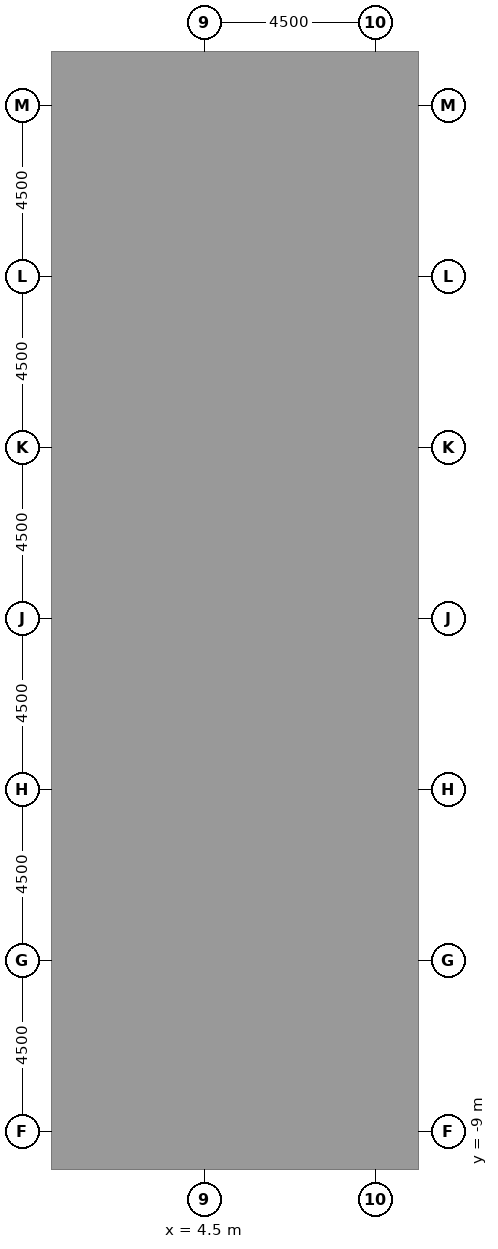
"""IFC4 building model, lengths in metres.
Left out: names, types, materials, properties, quantities, classifications, styles, units other than length and angle.
Written with IfcOpenShell. Run it as: python <this file> out.ifc"""

import sys

from ifc_helpers import new_model, si_unit, direction, frame, frame_2d, origin, place, context, subcontext, project, spatial, rectangle, extrude, element, fill, save


model = new_model("IFC4")
c1 = context("Model", 3, precision=1e-05, world=origin(), true_north=direction((0.0, 1.0)))
c2 = subcontext(c1, "Body", "Model", "MODEL_VIEW")
j1 = project(units=[si_unit("LENGTHUNIT", "METRE"), si_unit("PLANEANGLEUNIT", "RADIAN")], contexts=[c1])
p1 = place(None, origin())
s1 = spatial("IfcSite", under=j1, at=p1, CompositionType="ELEMENT")
p2 = place(p1, origin())
s2 = spatial("IfcBuilding", under=s1, at=p2, CompositionType="ELEMENT")
p3 = place(p2, frame((0.0, 0.0, 7.2)))
s3 = spatial("IfcBuildingStorey", under=s2, at=p3, CompositionType="ELEMENT", Elevation=7.2)
p4 = place(p3, frame((1.0, -9.0, 0.0), z_axis=(0.0, 0.0, 1.0), x_axis=(0.0, 1.0, 0.0)))
e1 = element("IfcWall", 1, at=p4, inside=s3, PredefinedType="SHEAR", context=c2, shape_type="SweptSolid", body=[
    extrude(rectangle(XDim=27.5, YDim=1.0, at=frame_2d((13.75, 0.0))), origin(), (0.0, 0.0, 1.0), 4.1),
])
p5 = place(p4, frame((12.55, 0.0, 0.0)))
e2 = element("IfcOpeningElement", 2, at=p5, cuts=e1, PredefinedType="OPENING", context=c2, shape_type="SweptSolid", body=[
    extrude(rectangle(XDim=2.4, YDim=2.4, at=frame_2d((1.2, 1.2))), frame((0.0, 0.51, 0.0), z_axis=(0.0, -1.0, 0.0), x_axis=(1.0, 0.0, 0.0)), (0.0, 0.0, 1.0), 1.02),
])
p6 = place(p4, frame((4.025, 0.0, 0.0)))
e3 = element("IfcOpeningElement", 3, at=p6, cuts=e1, PredefinedType="OPENING", context=c2, shape_type="SweptSolid", body=[
    extrude(rectangle(XDim=1.2, YDim=2.1, at=frame_2d((0.6, 1.05))), frame((0.0, 0.51, 0.0), z_axis=(0.0, -1.0, 0.0), x_axis=(1.0, 0.0, 0.0)), (0.0, 0.0, 1.0), 1.02),
])
p7 = place(p4, frame((22.275, 0.0, 0.0)))
e4 = element("IfcOpeningElement", 4, at=p7, cuts=e1, PredefinedType="OPENING", context=c2, shape_type="SweptSolid", body=[
    extrude(rectangle(XDim=1.2, YDim=2.1, at=frame_2d((0.6, 1.05))), frame((0.0, 0.51, 0.0), z_axis=(0.0, -1.0, 0.0), x_axis=(1.0, 0.0, 0.0)), (0.0, 0.0, 1.0), 1.02),
])
p8 = place(p3, frame((6.5, -9.0, 0.0), z_axis=(0.0, 0.0, 1.0), x_axis=(0.0, 1.0, 0.0)))
e5 = element("IfcWall", 5, at=p8, inside=s3, PredefinedType="SHEAR", context=c2, shape_type="SweptSolid", body=[
    extrude(rectangle(XDim=27.5, YDim=1.0, at=frame_2d((13.75, 0.0))), origin(), (0.0, 0.0, 1.0), 4.1),
])
p9 = place(p8, frame((12.55, 0.0, 0.0)))
e6 = element("IfcOpeningElement", 6, at=p9, cuts=e5, PredefinedType="OPENING", context=c2, shape_type="SweptSolid", body=[
    extrude(rectangle(XDim=2.4, YDim=2.4, at=frame_2d((1.2, 1.2))), frame((0.0, 0.51, 0.0), z_axis=(0.0, -1.0, 0.0), x_axis=(1.0, 0.0, 0.0)), (0.0, 0.0, 1.0), 1.02),
])
p10 = place(p8, frame((4.025, 0.0, 0.0)))
e7 = element("IfcOpeningElement", 7, at=p10, cuts=e5, PredefinedType="OPENING", context=c2, shape_type="SweptSolid", body=[
    extrude(rectangle(XDim=1.2, YDim=2.1, at=frame_2d((0.6, 1.05))), frame((0.0, 0.51, 0.0), z_axis=(0.0, -1.0, 0.0), x_axis=(1.0, 0.0, 0.0)), (0.0, 0.0, 1.0), 1.02),
])
p11 = place(p8, frame((22.275, 0.0, 0.0)))
e8 = element("IfcOpeningElement", 8, at=p11, cuts=e5, PredefinedType="OPENING", context=c2, shape_type="SweptSolid", body=[
    extrude(rectangle(XDim=1.2, YDim=2.1, at=frame_2d((0.6, 1.05))), frame((0.0, 0.51, 0.0), z_axis=(0.0, -1.0, 0.0), x_axis=(1.0, 0.0, 0.0)), (0.0, 0.0, 1.0), 1.02),
])
for number, where, z_axis, x_axis in (
    (9, (7.0, -8.5, 0.0), (0.0, 0.0, 1.0), (1.0, 0.0, 0.0)),
    (10, (7.0, 18.0, 0.0), (0.0, 0.0, 1.0), (1.0, 0.0, 0.0)),
):
    element("IfcWall", number, at=place(p3, frame(where, z_axis=z_axis, x_axis=x_axis)), inside=s3, PredefinedType="SHEAR", context=c2, shape_type="SweptSolid", body=[
        extrude(rectangle(XDim=10.0, YDim=1.0, at=frame_2d((5.0, 0.0))), origin(), (0.0, 0.0, 1.0), 4.1),
    ])
p12 = place(p3, frame((7.0, -0.5, 0.0), z_axis=(0.0, 0.0, 1.0), x_axis=(1.0, 0.0, 0.0)))
e11 = element("IfcWall", 11, at=p12, inside=s3, PredefinedType="SHEAR", context=c2, shape_type="SweptSolid", body=[
    extrude(rectangle(XDim=10.0, YDim=0.5, at=frame_2d((5.0, 0.0))), origin(), (0.0, 0.0, 1.0), 4.1),
])
p13 = place(p3, frame((7.0, 2.8, 0.0), z_axis=(0.0, 0.0, 1.0), x_axis=(1.0, 0.0, 0.0)))
e12 = element("IfcWall", 12, at=p13, inside=s3, PredefinedType="SHEAR", context=c2, shape_type="SweptSolid", body=[
    extrude(rectangle(XDim=10.0, YDim=0.5, at=frame_2d((5.0, 0.0))), origin(), (0.0, 0.0, 1.0), 4.1),
])
p14 = place(p13, frame((0.512, 0.0, 0.0)))
e13 = element("IfcOpeningElement", 13, at=p14, cuts=e12, PredefinedType="OPENING", context=c2, shape_type="SweptSolid", body=[
    extrude(rectangle(XDim=1.1, YDim=2.1, at=frame_2d((0.55, 1.05))), frame((0.0, 0.26, 0.0), z_axis=(0.0, -1.0, 0.0), x_axis=(1.0, 0.0, 0.0)), (0.0, 0.0, 1.0), 0.52),
])
p15 = place(p13, frame((3.137, 0.0, 0.0)))
e14 = element("IfcOpeningElement", 14, at=p15, cuts=e12, PredefinedType="OPENING", context=c2, shape_type="SweptSolid", body=[
    extrude(rectangle(XDim=1.1, YDim=2.1, at=frame_2d((0.55, 1.05))), frame((0.0, 0.26, 0.0), z_axis=(0.0, -1.0, 0.0), x_axis=(1.0, 0.0, 0.0)), (0.0, 0.0, 1.0), 0.52),
])
p16 = place(p13, frame((8.387, 0.0, 0.0)))
e15 = element("IfcOpeningElement", 15, at=p16, cuts=e12, PredefinedType="OPENING", context=c2, shape_type="SweptSolid", body=[
    extrude(rectangle(XDim=1.1, YDim=2.1, at=frame_2d((0.55, 1.05))), frame((0.0, 0.26, 0.0), z_axis=(0.0, -1.0, 0.0), x_axis=(1.0, 0.0, 0.0)), (0.0, 0.0, 1.0), 0.52),
])
p17 = place(p3, frame((7.0, 6.7, 0.0), z_axis=(0.0, 0.0, 1.0), x_axis=(1.0, 0.0, 0.0)))
e16 = element("IfcWall", 16, at=p17, inside=s3, PredefinedType="SHEAR", context=c2, shape_type="SweptSolid", body=[
    extrude(rectangle(XDim=10.0, YDim=0.5, at=frame_2d((5.0, 0.0))), origin(), (0.0, 0.0, 1.0), 4.1),
])
p18 = place(p17, frame((0.512, 0.0, 0.0)))
e17 = element("IfcOpeningElement", 17, at=p18, cuts=e16, PredefinedType="OPENING", context=c2, shape_type="SweptSolid", body=[
    extrude(rectangle(XDim=1.1, YDim=2.1, at=frame_2d((0.55, 1.05))), frame((0.0, 0.26, 0.0), z_axis=(0.0, -1.0, 0.0), x_axis=(1.0, 0.0, 0.0)), (0.0, 0.0, 1.0), 0.52),
])
p19 = place(p17, frame((3.188, 0.0, 0.0)))
e18 = element("IfcOpeningElement", 18, at=p19, cuts=e16, PredefinedType="OPENING", context=c2, shape_type="SweptSolid", body=[
    extrude(rectangle(XDim=1.0, YDim=2.1, at=frame_2d((0.5, 1.05))), frame((0.0, 0.26, 0.0), z_axis=(0.0, -1.0, 0.0), x_axis=(1.0, 0.0, 0.0)), (0.0, 0.0, 1.0), 0.52),
])
p20 = place(p17, frame((5.812, 0.0, 0.0)))
e19 = element("IfcOpeningElement", 19, at=p20, cuts=e16, PredefinedType="OPENING", context=c2, shape_type="SweptSolid", body=[
    extrude(rectangle(XDim=1.0, YDim=2.1, at=frame_2d((0.5, 1.05))), frame((0.0, 0.26, 0.0), z_axis=(0.0, -1.0, 0.0), x_axis=(1.0, 0.0, 0.0)), (0.0, 0.0, 1.0), 0.52),
])
p21 = place(p17, frame((8.438, 0.0, 0.0)))
e20 = element("IfcOpeningElement", 20, at=p21, cuts=e16, PredefinedType="OPENING", context=c2, shape_type="SweptSolid", body=[
    extrude(rectangle(XDim=1.0, YDim=2.1, at=frame_2d((0.5, 1.05))), frame((0.0, 0.26, 0.0), z_axis=(0.0, -1.0, 0.0), x_axis=(1.0, 0.0, 0.0)), (0.0, 0.0, 1.0), 0.52),
])
p22 = place(p3, frame((7.0, 10.0, 0.0), z_axis=(0.0, 0.0, 1.0), x_axis=(1.0, 0.0, 0.0)))
e21 = element("IfcWall", 21, at=p22, inside=s3, PredefinedType="SHEAR", context=c2, shape_type="SweptSolid", body=[
    extrude(rectangle(XDim=10.0, YDim=0.5, at=frame_2d((5.0, 0.0))), origin(), (0.0, 0.0, 1.0), 4.1),
])
for number, where, z_axis, x_axis in (
    (22, (9.375, -0.25, 0.0), (0.0, 0.0, 1.0), (0.0, 1.0, 0.0)),
    (23, (9.375, 6.95, 0.0), (0.0, 0.0, 1.0), (0.0, 1.0, 0.0)),
):
    element("IfcWall", number, at=place(p3, frame(where, z_axis=z_axis, x_axis=x_axis)), inside=s3, PredefinedType="SHEAR", context=c2, shape_type="SweptSolid", body=[
        extrude(rectangle(XDim=2.8, YDim=0.5, at=frame_2d((1.4, 0.0))), origin(), (0.0, 0.0, 1.0), 4.1),
    ])
p23 = place(p3, frame((8.5, -8.0, 0.0), z_axis=(0.0, 0.0, 1.0), x_axis=(0.0, 1.0, 0.0)))
e24 = element("IfcWall", 24, at=p23, inside=s3, PredefinedType="PARTITIONING", context=c2, shape_type="SweptSolid", body=[
    extrude(rectangle(XDim=2.465, YDim=0.1, at=frame_2d((1.232, 0.0))), origin(), (0.0, 0.0, 1.0), 3.65),
])
p24 = place(p23, frame((0.732, 0.0, 0.0)))
e25 = element("IfcOpeningElement", 25, at=p24, cuts=e24, PredefinedType="OPENING", context=c2, shape_type="SweptSolid", body=[
    extrude(rectangle(XDim=1.0, YDim=2.1, at=frame_2d((0.5, 1.05))), frame((0.0, 0.06, 0.0), z_axis=(0.0, -1.0, 0.0), x_axis=(1.0, 0.0, 0.0)), (0.0, 0.0, 1.0), 0.12),
])
p25 = place(p3, frame((8.5, -5.535, 0.0), z_axis=(0.0, 0.0, 1.0), x_axis=(0.0, 1.0, 0.0)))
e26 = element("IfcWall", 26, at=p25, inside=s3, PredefinedType="PARTITIONING", context=c2, shape_type="SweptSolid", body=[
    extrude(rectangle(XDim=2.03, YDim=0.1, at=frame_2d((1.015, 0.0))), origin(), (0.0, 0.0, 1.0), 3.65),
])
p26 = place(p25, frame((0.515, 0.0, 0.0)))
e27 = element("IfcOpeningElement", 27, at=p26, cuts=e26, PredefinedType="OPENING", context=c2, shape_type="SweptSolid", body=[
    extrude(rectangle(XDim=1.0, YDim=2.1, at=frame_2d((0.5, 1.05))), frame((0.0, 0.06, 0.0), z_axis=(0.0, -1.0, 0.0), x_axis=(1.0, 0.0, 0.0)), (0.0, 0.0, 1.0), 0.12),
])
p27 = place(p3, frame((8.5, -3.505, 0.0), z_axis=(0.0, 0.0, 1.0), x_axis=(0.0, 1.0, 0.0)))
e28 = element("IfcWall", 28, at=p27, inside=s3, PredefinedType="PARTITIONING", context=c2, shape_type="SweptSolid", body=[
    extrude(rectangle(XDim=2.755, YDim=0.1, at=frame_2d((1.377, 0.0))), origin(), (0.0, 0.0, 1.0), 3.65),
])
p28 = place(p27, frame((0.877, 0.0, 0.0)))
e29 = element("IfcOpeningElement", 29, at=p28, cuts=e28, PredefinedType="OPENING", context=c2, shape_type="SweptSolid", body=[
    extrude(rectangle(XDim=1.0, YDim=2.1, at=frame_2d((0.5, 1.05))), frame((0.0, 0.06, 0.0), z_axis=(0.0, -1.0, 0.0), x_axis=(1.0, 0.0, 0.0)), (0.0, 0.0, 1.0), 0.12),
])
for number, where, z_axis, x_axis in (
    (30, (8.5, -5.535, 0.0), (0.0, 0.0, 1.0), (1.0, 0.0, 0.0)),
    (31, (8.5, -3.505, 0.0), (0.0, 0.0, 1.0), (1.0, 0.0, 0.0)),
):
    element("IfcWall", number, at=place(p3, frame(where, z_axis=z_axis, x_axis=x_axis)), inside=s3, PredefinedType="PARTITIONING", context=c2, shape_type="SweptSolid", body=[
        extrude(rectangle(XDim=3.25, YDim=0.1, at=frame_2d((1.625, 0.0))), origin(), (0.0, 0.0, 1.0), 3.65),
    ])
p29 = place(p3, frame((8.4, 10.25, 0.0), z_axis=(0.0, 0.0, 1.0), x_axis=(0.0, 1.0, 0.0)))
e32 = element("IfcWall", 32, at=p29, inside=s3, PredefinedType="PARTITIONING", context=c2, shape_type="SweptSolid", body=[
    extrude(rectangle(XDim=2.175, YDim=0.1, at=frame_2d((1.087, 0.0))), origin(), (0.0, 0.0, 1.0), 3.65),
])
p30 = place(p29, frame((0.587, 0.0, 0.0)))
e33 = element("IfcOpeningElement", 33, at=p30, cuts=e32, PredefinedType="OPENING", context=c2, shape_type="SweptSolid", body=[
    extrude(rectangle(XDim=1.0, YDim=2.1, at=frame_2d((0.5, 1.05))), frame((0.0, 0.06, 0.0), z_axis=(0.0, -1.0, 0.0), x_axis=(1.0, 0.0, 0.0)), (0.0, 0.0, 1.0), 0.12),
])
p31 = place(p3, frame((8.4, 12.425, 0.0), z_axis=(0.0, 0.0, 1.0), x_axis=(0.0, 1.0, 0.0)))
e34 = element("IfcWall", 34, at=p31, inside=s3, PredefinedType="PARTITIONING", context=c2, shape_type="SweptSolid", body=[
    extrude(rectangle(XDim=2.32, YDim=0.1, at=frame_2d((1.16, 0.0))), origin(), (0.0, 0.0, 1.0), 3.65),
])
p32 = place(p31, frame((0.66, 0.0, 0.0)))
e35 = element("IfcOpeningElement", 35, at=p32, cuts=e34, PredefinedType="OPENING", context=c2, shape_type="SweptSolid", body=[
    extrude(rectangle(XDim=1.0, YDim=2.1, at=frame_2d((0.5, 1.05))), frame((0.0, 0.06, 0.0), z_axis=(0.0, -1.0, 0.0), x_axis=(1.0, 0.0, 0.0)), (0.0, 0.0, 1.0), 0.12),
])
p33 = place(p3, frame((8.4, 14.745, 0.0), z_axis=(0.0, 0.0, 1.0), x_axis=(0.0, 1.0, 0.0)))
e36 = element("IfcWall", 36, at=p33, inside=s3, PredefinedType="PARTITIONING", context=c2, shape_type="SweptSolid", body=[
    extrude(rectangle(XDim=2.755, YDim=0.1, at=frame_2d((1.377, 0.0))), origin(), (0.0, 0.0, 1.0), 3.65),
])
p34 = place(p33, frame((0.877, 0.0, 0.0)))
e37 = element("IfcOpeningElement", 37, at=p34, cuts=e36, PredefinedType="OPENING", context=c2, shape_type="SweptSolid", body=[
    extrude(rectangle(XDim=1.0, YDim=2.1, at=frame_2d((0.5, 1.05))), frame((0.0, 0.06, 0.0), z_axis=(0.0, -1.0, 0.0), x_axis=(1.0, 0.0, 0.0)), (0.0, 0.0, 1.0), 0.12),
])
for number, where, z_axis, x_axis in (
    (38, (8.4, 12.425, 0.0), (0.0, 0.0, 1.0), (1.0, 0.0, 0.0)),
    (39, (8.4, 14.745, 0.0), (0.0, 0.0, 1.0), (1.0, 0.0, 0.0)),
):
    element("IfcWall", number, at=place(p3, frame(where, z_axis=z_axis, x_axis=x_axis)), inside=s3, PredefinedType="PARTITIONING", context=c2, shape_type="SweptSolid", body=[
        extrude(rectangle(XDim=3.35, YDim=0.1, at=frame_2d((1.675, 0.0))), origin(), (0.0, 0.0, 1.0), 3.65),
    ])
p35 = place(p3, frame((1.5, 6.7, 0.0), z_axis=(0.0, 0.0, 1.0), x_axis=(1.0, 0.0, 0.0)))
e40 = element("IfcWall", 40, at=p35, inside=s3, PredefinedType="PARTITIONING", context=c2, shape_type="SweptSolid", body=[
    extrude(rectangle(XDim=4.5, YDim=0.2, at=frame_2d((2.25, 0.0))), origin(), (0.0, 0.0, 1.0), 3.65),
])
p36 = place(p35, frame((1.85, 0.0, 0.0)))
e41 = element("IfcOpeningElement", 41, at=p36, cuts=e40, PredefinedType="OPENING", context=c2, shape_type="SweptSolid", body=[
    extrude(rectangle(XDim=1.0, YDim=2.1, at=frame_2d((0.5, 1.05))), frame((0.0, 0.11, 0.0), z_axis=(0.0, -1.0, 0.0), x_axis=(1.0, 0.0, 0.0)), (0.0, 0.0, 1.0), 0.22),
])
p37 = place(p3, frame((1.5, 18.5, 0.0), z_axis=(0.0, 0.0, 1.0), x_axis=(1.0, 0.0, 0.0)))
e42 = element("IfcWall", 42, at=p37, inside=s3, PredefinedType="PARTITIONING", context=c2, shape_type="SweptSolid", body=[
    extrude(rectangle(XDim=4.5, YDim=0.2, at=frame_2d((2.25, 0.0))), origin(), (0.0, 0.0, 1.0), 3.65),
])
p38 = place(p14, origin())
e43 = element("IfcDoor", 43, at=p38, inside=s3, OperationType="DOUBLE_DOOR_SLIDING", PredefinedType="DOOR", context=c2, shape_type="SweptSolid", body=[
    extrude(rectangle(XDim=1.1, YDim=2.1, at=frame_2d((0.55, 1.05))), frame((0.0, 0.025, 0.0), z_axis=(0.0, -1.0, 0.0), x_axis=(1.0, 0.0, 0.0)), (0.0, 0.0, 1.0), 0.05),
])
fill(e13, e43)
p39 = place(p18, origin())
e44 = element("IfcDoor", 44, at=p39, inside=s3, OperationType="DOUBLE_DOOR_SLIDING", PredefinedType="DOOR", context=c2, shape_type="SweptSolid", body=[
    extrude(rectangle(XDim=1.1, YDim=2.1, at=frame_2d((0.55, 1.05))), frame((0.0, 0.025, 0.0), z_axis=(0.0, -1.0, 0.0), x_axis=(1.0, 0.0, 0.0)), (0.0, 0.0, 1.0), 0.05),
])
fill(e17, e44)
p40 = place(p5, origin())
e45 = element("IfcDoor", 45, at=p40, inside=s3, OperationType="DOUBLE_DOOR_DOUBLE_SWING", PredefinedType="DOOR", context=c2, shape_type="SweptSolid", body=[
    extrude(rectangle(XDim=2.4, YDim=2.4, at=frame_2d((1.2, 1.2))), frame((0.0, 0.025, 0.0), z_axis=(0.0, -1.0, 0.0), x_axis=(1.0, 0.0, 0.0)), (0.0, 0.0, 1.0), 0.05),
])
fill(e2, e45)
p41 = place(p9, origin())
e46 = element("IfcDoor", 46, at=p41, inside=s3, OperationType="DOUBLE_DOOR_DOUBLE_SWING", PredefinedType="DOOR", context=c2, shape_type="SweptSolid", body=[
    extrude(rectangle(XDim=2.4, YDim=2.4, at=frame_2d((1.2, 1.2))), frame((0.0, 0.025, 0.0), z_axis=(0.0, -1.0, 0.0), x_axis=(1.0, 0.0, 0.0)), (0.0, 0.0, 1.0), 0.05),
])
fill(e6, e46)
p42 = place(p6, origin())
e47 = element("IfcDoor", 47, at=p42, inside=s3, OperationType="SINGLE_SWING_LEFT", PredefinedType="DOOR", context=c2, shape_type="SweptSolid", body=[
    extrude(rectangle(XDim=1.2, YDim=2.1, at=frame_2d((0.6, 1.05))), frame((0.0, 0.475, 0.0), z_axis=(0.0, -1.0, 0.0), x_axis=(1.0, 0.0, 0.0)), (0.0, 0.0, 1.0), 0.05),
])
fill(e3, e47)
p43 = place(p7, origin())
e48 = element("IfcDoor", 48, at=p43, inside=s3, OperationType="SINGLE_SWING_LEFT", PredefinedType="DOOR", context=c2, shape_type="SweptSolid", body=[
    extrude(rectangle(XDim=1.2, YDim=2.1, at=frame_2d((0.6, 1.05))), frame((0.0, 0.475, 0.0), z_axis=(0.0, -1.0, 0.0), x_axis=(1.0, 0.0, 0.0)), (0.0, 0.0, 1.0), 0.05),
])
fill(e4, e48)
p44 = place(p10, origin())
e49 = element("IfcDoor", 49, at=p44, inside=s3, OperationType="SINGLE_SWING_RIGHT", PredefinedType="DOOR", context=c2, shape_type="SweptSolid", body=[
    extrude(rectangle(XDim=1.2, YDim=2.1, at=frame_2d((0.6, 1.05))), frame((0.0, -0.425, 0.0), z_axis=(0.0, -1.0, 0.0), x_axis=(1.0, 0.0, 0.0)), (0.0, 0.0, 1.0), 0.05),
])
fill(e7, e49)
p45 = place(p24, origin())
e50 = element("IfcDoor", 50, at=p45, inside=s3, OperationType="SINGLE_SWING_LEFT", PredefinedType="DOOR", context=c2, shape_type="SweptSolid", body=[
    extrude(rectangle(XDim=1.0, YDim=2.1, at=frame_2d((0.5, 1.05))), frame((0.0, 0.025, 0.0), z_axis=(0.0, -1.0, 0.0), x_axis=(1.0, 0.0, 0.0)), (0.0, 0.0, 1.0), 0.05),
])
fill(e25, e50)
p46 = place(p26, origin())
e51 = element("IfcDoor", 51, at=p46, inside=s3, OperationType="SINGLE_SWING_RIGHT", PredefinedType="DOOR", context=c2, shape_type="SweptSolid", body=[
    extrude(rectangle(XDim=1.0, YDim=2.1, at=frame_2d((0.5, 1.05))), frame((0.0, 0.025, 0.0), z_axis=(0.0, -1.0, 0.0), x_axis=(1.0, 0.0, 0.0)), (0.0, 0.0, 1.0), 0.05),
])
fill(e27, e51)
p47 = place(p28, origin())
e52 = element("IfcDoor", 52, at=p47, inside=s3, OperationType="SINGLE_SWING_LEFT", PredefinedType="DOOR", context=c2, shape_type="SweptSolid", body=[
    extrude(rectangle(XDim=1.0, YDim=2.1, at=frame_2d((0.5, 1.05))), frame((0.0, 0.025, 0.0), z_axis=(0.0, -1.0, 0.0), x_axis=(1.0, 0.0, 0.0)), (0.0, 0.0, 1.0), 0.05),
])
fill(e29, e52)
p48 = place(p11, origin())
e53 = element("IfcDoor", 53, at=p48, inside=s3, OperationType="SINGLE_SWING_RIGHT", PredefinedType="DOOR", context=c2, shape_type="SweptSolid", body=[
    extrude(rectangle(XDim=1.2, YDim=2.1, at=frame_2d((0.6, 1.05))), frame((0.0, -0.425, 0.0), z_axis=(0.0, -1.0, 0.0), x_axis=(1.0, 0.0, 0.0)), (0.0, 0.0, 1.0), 0.05),
])
fill(e8, e53)
p49 = place(p30, origin())
e54 = element("IfcDoor", 54, at=p49, inside=s3, OperationType="SINGLE_SWING_LEFT", PredefinedType="DOOR", context=c2, shape_type="SweptSolid", body=[
    extrude(rectangle(XDim=1.0, YDim=2.1, at=frame_2d((0.5, 1.05))), frame((0.0, 0.025, 0.0), z_axis=(0.0, -1.0, 0.0), x_axis=(1.0, 0.0, 0.0)), (0.0, 0.0, 1.0), 0.05),
])
fill(e33, e54)
p50 = place(p32, origin())
e55 = element("IfcDoor", 55, at=p50, inside=s3, OperationType="SINGLE_SWING_RIGHT", PredefinedType="DOOR", context=c2, shape_type="SweptSolid", body=[
    extrude(rectangle(XDim=1.0, YDim=2.1, at=frame_2d((0.5, 1.05))), frame((0.0, 0.025, 0.0), z_axis=(0.0, -1.0, 0.0), x_axis=(1.0, 0.0, 0.0)), (0.0, 0.0, 1.0), 0.05),
])
fill(e35, e55)
p51 = place(p34, origin())
e56 = element("IfcDoor", 56, at=p51, inside=s3, OperationType="SINGLE_SWING_LEFT", PredefinedType="DOOR", context=c2, shape_type="SweptSolid", body=[
    extrude(rectangle(XDim=1.0, YDim=2.1, at=frame_2d((0.5, 1.05))), frame((0.0, 0.025, 0.0), z_axis=(0.0, -1.0, 0.0), x_axis=(1.0, 0.0, 0.0)), (0.0, 0.0, 1.0), 0.05),
])
fill(e37, e56)
p52 = place(p36, origin())
e57 = element("IfcDoor", 57, at=p52, inside=s3, OperationType="SINGLE_SWING_RIGHT", PredefinedType="DOOR", context=c2, shape_type="SweptSolid", body=[
    extrude(rectangle(XDim=1.0, YDim=2.1, at=frame_2d((0.5, 1.05))), frame((0.0, 0.025, 0.0), z_axis=(0.0, -1.0, 0.0), x_axis=(1.0, 0.0, 0.0)), (0.0, 0.0, 1.0), 0.05),
])
fill(e41, e57)
save(model, sys.argv[1])
